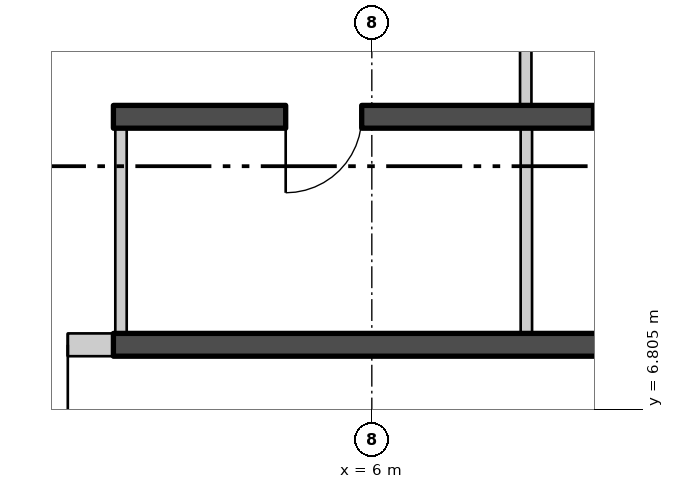
"""IFC4 building model, lengths in metres.
Left out: names, types, materials, properties, quantities, classifications, styles, units other than length and angle.
Written with IfcOpenShell. Run it as: python <this file> out.ifc"""

import sys

from ifc_helpers import new_model, si_unit, direction, frame, frame_2d, origin, place, context, subcontext, project, spatial, polyline, rectangle, outline, extrude, element, fill, save


model = new_model("IFC4")
c1 = context("Model", 3, precision=1e-05, world=origin(), true_north=direction((0.0, 1.0)))
c2 = subcontext(c1, "Body", "Model", "MODEL_VIEW")
j1 = project(units=[si_unit("LENGTHUNIT", "METRE"), si_unit("PLANEANGLEUNIT", "RADIAN")], contexts=[c1])
p1 = place(None, origin())
s1 = spatial("IfcSite", under=j1, at=p1, CompositionType="ELEMENT")
p2 = place(p1, origin())
s2 = spatial("IfcBuilding", under=s1, at=p2, CompositionType="ELEMENT")
p3 = place(p2, frame((0.0, 0.0, 312.6)))
s3 = spatial("IfcBuildingStorey", under=s2, at=p3, CompositionType="ELEMENT", Elevation=312.6)
p4 = place(p3, frame((2.12, -23.301, -0.18), z_axis=(0.0, 0.0, 1.0), x_axis=(0.500000141277, 0.866025322218, 0.0)))
e1 = element("IfcWall", 1, at=p4, inside=s3, PredefinedType="SOLIDWALL", context=c2, shape_type="SweptSolid", body=[
    extrude(outline(polyline([(-0.13, -0.225), (45.86, -0.225), (45.6, 0.225), (0.13, 0.225), (-0.13, -0.225)])), origin(), (0.0, 0.0, 1.0), 3.98),
])
p5 = place(p4, frame((1.424, 0.0, 1.08)))
e2 = element("IfcOpeningElement", 2, at=p5, cuts=e1, PredefinedType="OPENING", context=c2, shape_type="SweptSolid", body=[
    extrude(rectangle(XDim=2.4, YDim=2.3, at=frame_2d((1.2, 1.15))), frame((0.0, 0.235, 0.0), z_axis=(0.0, -1.0, 0.0), x_axis=(1.0, 0.0, 0.0)), (0.0, 0.0, 1.0), 0.47),
])
p6 = place(p4, frame((5.892, 0.0, 1.08)))
e3 = element("IfcOpeningElement", 3, at=p6, cuts=e1, PredefinedType="OPENING", context=c2, shape_type="SweptSolid", body=[
    extrude(rectangle(XDim=2.4, YDim=2.3, at=frame_2d((1.2, 1.15))), frame((0.0, 0.235, 0.0), z_axis=(0.0, -1.0, 0.0), x_axis=(1.0, 0.0, 0.0)), (0.0, 0.0, 1.0), 0.47),
])
p7 = place(p4, frame((14.905, 0.0, 1.08)))
e4 = element("IfcOpeningElement", 4, at=p7, cuts=e1, PredefinedType="OPENING", context=c2, shape_type="SweptSolid", body=[
    extrude(rectangle(XDim=2.4, YDim=2.3, at=frame_2d((1.2, 1.15))), frame((0.0, 0.235, 0.0), z_axis=(0.0, -1.0, 0.0), x_axis=(1.0, 0.0, 0.0)), (0.0, 0.0, 1.0), 0.47),
])
p8 = place(p4, frame((19.412, 0.0, 1.08)))
e5 = element("IfcOpeningElement", 5, at=p8, cuts=e1, PredefinedType="OPENING", context=c2, shape_type="SweptSolid", body=[
    extrude(rectangle(XDim=2.4, YDim=2.3, at=frame_2d((1.2, 1.15))), frame((0.0, 0.235, 0.0), z_axis=(0.0, -1.0, 0.0), x_axis=(1.0, 0.0, 0.0)), (0.0, 0.0, 1.0), 0.47),
])
p9 = place(p4, frame((23.918, 0.0, 1.08)))
e6 = element("IfcOpeningElement", 6, at=p9, cuts=e1, PredefinedType="OPENING", context=c2, shape_type="SweptSolid", body=[
    extrude(rectangle(XDim=2.4, YDim=2.3, at=frame_2d((1.2, 1.15))), frame((0.0, 0.235, 0.0), z_axis=(0.0, -1.0, 0.0), x_axis=(1.0, 0.0, 0.0)), (0.0, 0.0, 1.0), 0.47),
])
p10 = place(p4, frame((28.425, 0.0, 1.08)))
e7 = element("IfcOpeningElement", 7, at=p10, cuts=e1, PredefinedType="OPENING", context=c2, shape_type="SweptSolid", body=[
    extrude(rectangle(XDim=2.4, YDim=2.3, at=frame_2d((1.2, 1.15))), frame((0.0, 0.235, 0.0), z_axis=(0.0, -1.0, 0.0), x_axis=(1.0, 0.0, 0.0)), (0.0, 0.0, 1.0), 0.47),
])
p11 = place(p4, frame((37.438, 0.0, 1.08)))
e8 = element("IfcOpeningElement", 8, at=p11, cuts=e1, PredefinedType="OPENING", context=c2, shape_type="SweptSolid", body=[
    extrude(rectangle(XDim=2.4, YDim=2.3, at=frame_2d((1.2, 1.15))), frame((0.0, 0.235, 0.0), z_axis=(0.0, -1.0, 0.0), x_axis=(1.0, 0.0, 0.0)), (0.0, 0.0, 1.0), 0.47),
])
p12 = place(p4, frame((41.907, 0.0, 1.08)))
e9 = element("IfcOpeningElement", 9, at=p12, cuts=e1, PredefinedType="OPENING", context=c2, shape_type="SweptSolid", body=[
    extrude(rectangle(XDim=2.4, YDim=2.3, at=frame_2d((1.2, 1.15))), frame((0.0, 0.235, 0.0), z_axis=(0.0, -1.0, 0.0), x_axis=(1.0, 0.0, 0.0)), (0.0, 0.0, 1.0), 0.47),
])
p13 = place(p3, frame((2.6, 10.65, 0.0), z_axis=(0.0, 0.0, 1.0), x_axis=(1.0, 0.0, 0.0)))
e10 = element("IfcWall", 10, at=p13, inside=s3, PredefinedType="SHEAR", context=c2, shape_type="SweptSolid", body=[
    extrude(rectangle(XDim=8.1, YDim=0.3, at=frame_2d((4.05, 0.0))), origin(), (0.0, 0.0, 1.0), 4.0),
])
p14 = place(p13, frame((2.267, 0.0, 0.0)))
e11 = element("IfcOpeningElement", 11, at=p14, cuts=e10, PredefinedType="OPENING", context=c2, shape_type="SweptSolid", body=[
    extrude(rectangle(XDim=1.0, YDim=2.1, at=frame_2d((0.5, 1.05))), frame((0.0, 0.16, 0.0), z_axis=(0.0, -1.0, 0.0), x_axis=(1.0, 0.0, 0.0)), (0.0, 0.0, 1.0), 0.32),
])
p15 = place(p13, frame((6.317, 0.0, 0.0)))
e12 = element("IfcOpeningElement", 12, at=p15, cuts=e10, PredefinedType="OPENING", context=c2, shape_type="SweptSolid", body=[
    extrude(rectangle(XDim=1.0, YDim=2.1, at=frame_2d((0.5, 1.05))), frame((0.0, 0.16, 0.0), z_axis=(0.0, -1.0, 0.0), x_axis=(1.0, 0.0, 0.0)), (0.0, 0.0, 1.0), 0.32),
])
p16 = place(p3, frame((2.6, 7.65, 0.0), z_axis=(0.0, 0.0, 1.0), x_axis=(1.0, 0.0, 0.0)))
e13 = element("IfcWall", 13, at=p16, inside=s3, PredefinedType="SHEAR", context=c2, shape_type="SweptSolid", body=[
    extrude(rectangle(XDim=8.1, YDim=0.3, at=frame_2d((4.05, 0.0))), origin(), (0.0, 0.0, 1.0), 4.0),
])
for number, where, z_axis, x_axis in (
    (14, (2.7, 7.8, 0.0), (0.0, 0.0, 1.0), (0.0, 1.0, 0.0)),
    (15, (8.033, 7.8, 0.0), (0.0, 0.0, 1.0), (0.0, 1.0, 0.0)),
):
    element("IfcWall", number, at=place(p3, frame(where, z_axis=z_axis, x_axis=x_axis)), inside=s3, PredefinedType="PARTITIONING", context=c2, shape_type="SweptSolid", body=[
        extrude(rectangle(XDim=2.7, YDim=0.15, at=frame_2d((1.35, 0.0))), origin(), (0.0, 0.0, 1.0), 4.0),
    ])
p17 = place(p3, frame((8.025, 10.8, 0.0), z_axis=(0.0, 0.0, 1.0), x_axis=(0.0, 1.0, 0.0)))
e16 = element("IfcWall", 16, at=p17, inside=s3, PredefinedType="PARTITIONING", context=c2, shape_type="SweptSolid", body=[
    extrude(rectangle(XDim=3.6, YDim=0.15, at=frame_2d((1.8, 0.0))), origin(), (0.0, 0.0, 1.0), 4.0),
])
p18 = place(p17, frame((1.175, 0.0, 0.0)))
e17 = element("IfcOpeningElement", 17, at=p18, cuts=e16, PredefinedType="OPENING", context=c2, shape_type="SweptSolid", body=[
    extrude(rectangle(XDim=1.25, YDim=2.1, at=frame_2d((0.625, 1.05))), frame((0.0, 0.085, 0.0), z_axis=(0.0, -1.0, 0.0), x_axis=(1.0, 0.0, 0.0)), (0.0, 0.0, 1.0), 0.17),
])
p19 = place(p3, frame((-0.4, 7.65, 0.0), z_axis=(0.0, 0.0, 1.0), x_axis=(1.0, 0.0, 0.0)))
e18 = element("IfcWall", 18, at=p19, inside=s3, PredefinedType="PARTITIONING", context=c2, shape_type="SweptSolid", body=[
    extrude(rectangle(XDim=3.0, YDim=0.3, at=frame_2d((1.5, 0.0))), origin(), (0.0, 0.0, 1.0), 4.0),
])
p20 = place(p19, frame((0.6, 0.0, 0.0)))
e19 = element("IfcOpeningElement", 19, at=p20, cuts=e18, PredefinedType="OPENING", context=c2, shape_type="SweptSolid", body=[
    extrude(rectangle(XDim=1.8, YDim=2.4, at=frame_2d((0.9, 1.2))), frame((0.0, 0.16, 0.0), z_axis=(0.0, -1.0, 0.0), x_axis=(1.0, 0.0, 0.0)), (0.0, 0.0, 1.0), 0.32),
])
p21 = place(p14, origin())
e20 = element("IfcDoor", 20, at=p21, inside=s3, OperationType="SINGLE_SWING_LEFT", PredefinedType="DOOR", context=c2, shape_type="SweptSolid", body=[
    extrude(rectangle(XDim=1.0, YDim=2.1, at=frame_2d((0.5, 1.05))), frame((0.0, 0.025, 0.0), z_axis=(0.0, -1.0, 0.0), x_axis=(1.0, 0.0, 0.0)), (0.0, 0.0, 1.0), 0.05),
])
fill(e11, e20)
p22 = place(p15, origin())
e21 = element("IfcDoor", 21, at=p22, inside=s3, OperationType="SINGLE_SWING_RIGHT", PredefinedType="DOOR", context=c2, shape_type="SweptSolid", body=[
    extrude(rectangle(XDim=1.0, YDim=2.1, at=frame_2d((0.5, 1.05))), frame((0.0, 0.025, 0.0), z_axis=(0.0, -1.0, 0.0), x_axis=(1.0, 0.0, 0.0)), (0.0, 0.0, 1.0), 0.05),
])
fill(e12, e21)
p23 = place(p20, origin())
e22 = element("IfcDoor", 22, at=p23, inside=s3, OperationType="DOUBLE_DOOR_SINGLE_SWING", PredefinedType="DOOR", context=c2, shape_type="SweptSolid", body=[
    extrude(rectangle(XDim=1.8, YDim=2.4, at=frame_2d((0.9, 1.2))), frame((0.0, 0.025, 0.0), z_axis=(0.0, -1.0, 0.0), x_axis=(1.0, 0.0, 0.0)), (0.0, 0.0, 1.0), 0.05),
])
fill(e19, e22)
save(model, sys.argv[1])
